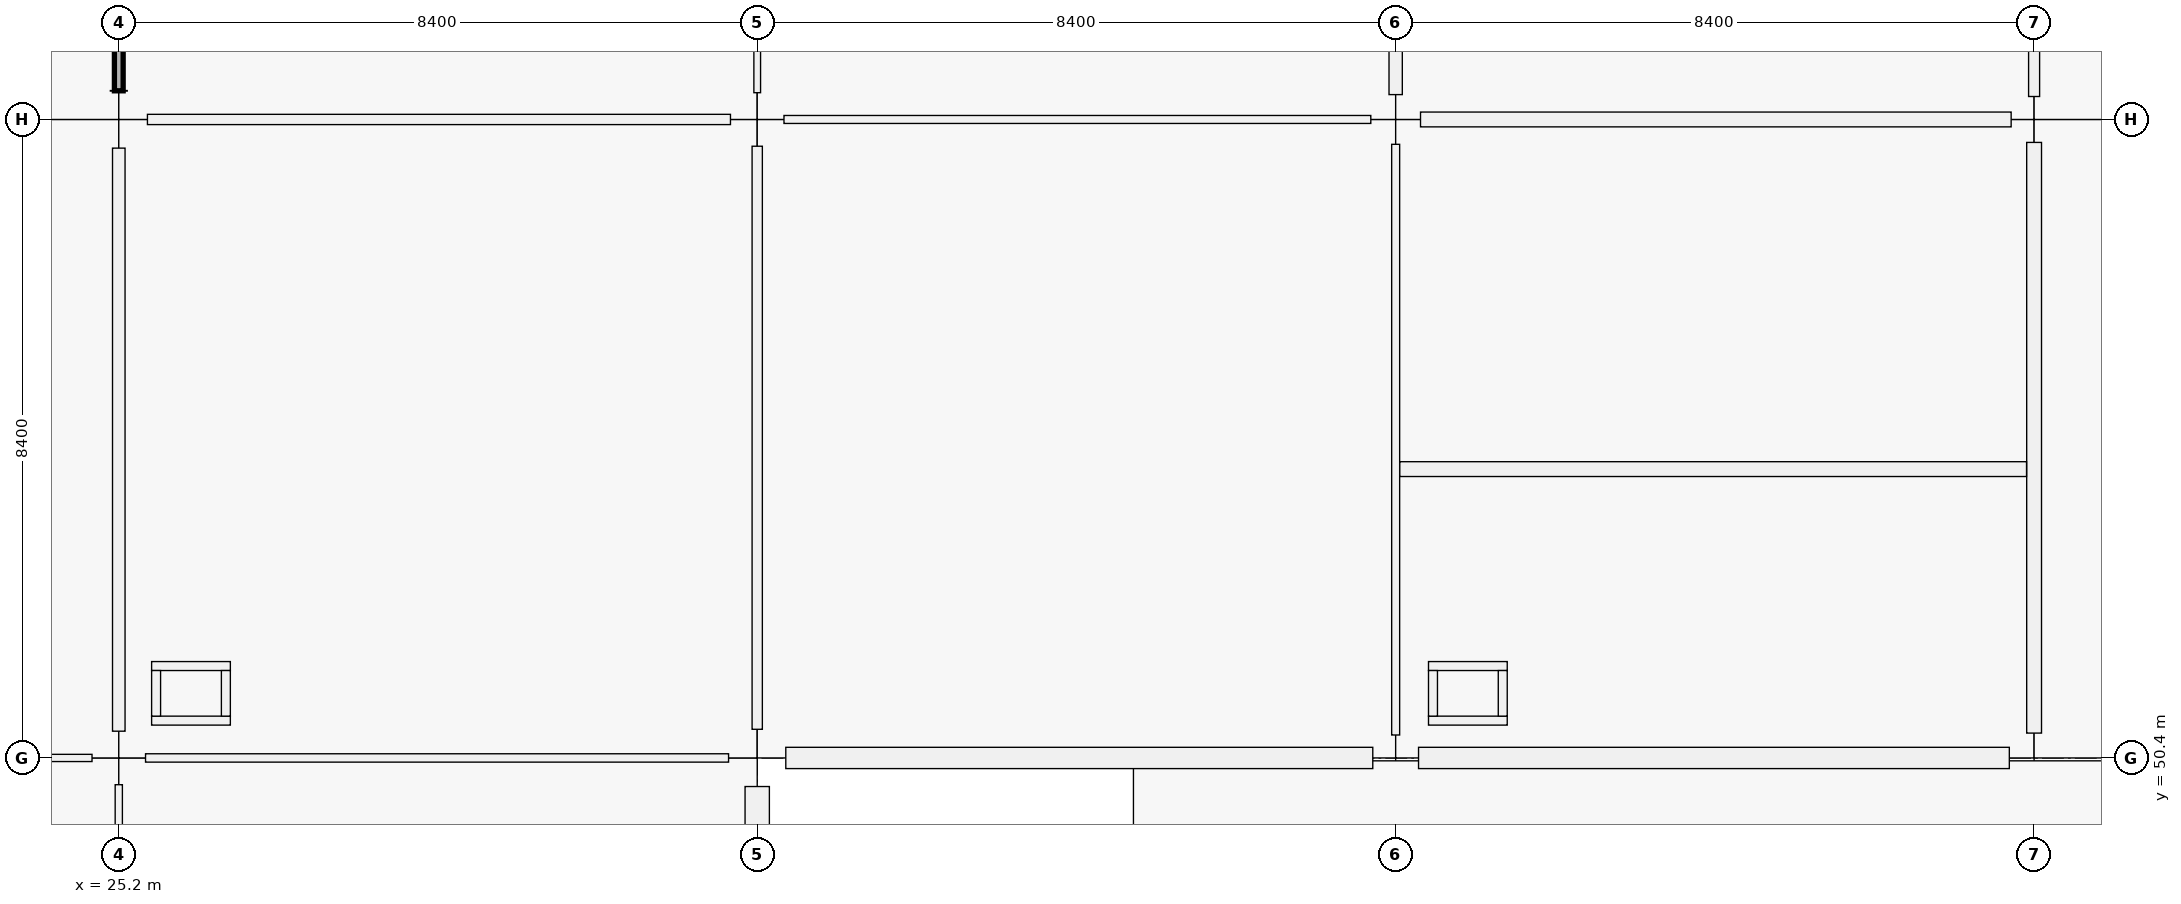
"""IFC4 building model, lengths in metres.
Left out: names, types, materials, properties, quantities, classifications, styles, units other than length and angle.
Written with IfcOpenShell. Run it as: python <this file> out.ifc"""

import sys

from ifc_helpers import new_model, si_unit, direction, frame, frame_2d, origin, origin_2d, place, context, subcontext, project, spatial, rectangle, extrude, element, fill, save


model = new_model("IFC4")
c1 = context("Model", 3, precision=1e-05, world=origin(), true_north=direction((0.0, 1.0)))
c2 = subcontext(c1, "Body", "Model", "MODEL_VIEW")
j1 = project(units=[si_unit("LENGTHUNIT", "METRE"), si_unit("PLANEANGLEUNIT", "RADIAN")], contexts=[c1])
p1 = place(None, origin())
s1 = spatial("IfcSite", under=j1, at=p1, CompositionType="ELEMENT")
p2 = place(p1, origin())
s2 = spatial("IfcBuilding", under=s1, at=p2, CompositionType="ELEMENT")
p3 = place(p2, frame((0.0, 0.0, 10.26)))
s3 = spatial("IfcBuildingStorey", under=s2, at=p3, CompositionType="ELEMENT", Elevation=10.26)
p4 = place(p3, frame((25.2, 50.4, 0.0), z_axis=(0.0, 0.0, 1.0), x_axis=(1.0, 0.0, 0.0)))
e1 = element("IfcColumn", 1, at=p4, inside=s3, PredefinedType="COLUMN", context=c2, shape_type="SweptSolid", body=[
    extrude(rectangle(XDim=0.7, YDim=0.7, at=origin_2d()), origin(), (0.0, 0.0, 1.0), 4.5),
])
for number, where, z_axis, x_axis in (
    (2, (25.2, 58.8, 0.0), (0.0, 0.0, 1.0), (1.0, 0.0, 0.0)),
    (3, (33.6, 50.4, 0.0), (0.0, 0.0, 1.0), (1.0, 0.0, 0.0)),
):
    element("IfcColumn", number, at=place(p3, frame(where, z_axis=z_axis, x_axis=x_axis)), inside=s3, PredefinedType="COLUMN", context=c2, shape_type="SweptSolid", body=[
        extrude(rectangle(XDim=0.75, YDim=0.75, at=origin_2d()), origin(), (0.0, 0.0, 1.0), 4.5),
    ])
p5 = place(p3, frame((33.6, 58.8, 0.0), z_axis=(0.0, 0.0, 1.0), x_axis=(1.0, 0.0, 0.0)))
e4 = element("IfcColumn", 4, at=p5, inside=s3, PredefinedType="COLUMN", context=c2, shape_type="SweptSolid", body=[
    extrude(rectangle(XDim=0.7, YDim=0.7, at=origin_2d()), origin(), (0.0, 0.0, 1.0), 4.5),
])
p6 = place(p3, frame((42.0, 50.4, 0.0), z_axis=(0.0, 0.0, 1.0), x_axis=(1.0, 0.0, 0.0)))
e5 = element("IfcColumn", 5, at=p6, inside=s3, PredefinedType="COLUMN", context=c2, shape_type="SweptSolid", body=[
    extrude(rectangle(XDim=0.6, YDim=0.6, at=origin_2d()), origin(), (0.0, 0.0, 1.0), 4.5),
])
for number, where, z_axis, x_axis in (
    (6, (42.0, 58.8, 0.0), (0.0, 0.0, 1.0), (1.0, 0.0, 0.0)),
    (7, (50.4, 50.4, 0.0), (0.0, 0.0, 1.0), (1.0, 0.0, 0.0)),
):
    element("IfcColumn", number, at=place(p3, frame(where, z_axis=z_axis, x_axis=x_axis)), inside=s3, PredefinedType="COLUMN", context=c2, shape_type="SweptSolid", body=[
        extrude(rectangle(XDim=0.65, YDim=0.65, at=origin_2d()), origin(), (0.0, 0.0, 1.0), 4.5),
    ])
p7 = place(p3, frame((50.4, 58.8, 0.0), z_axis=(0.0, 0.0, 1.0), x_axis=(1.0, 0.0, 0.0)))
e8 = element("IfcColumn", 8, at=p7, inside=s3, PredefinedType="COLUMN", context=c2, shape_type="SweptSolid", body=[
    extrude(rectangle(XDim=0.6, YDim=0.6, at=origin_2d()), origin(), (0.0, 0.0, 1.0), 4.5),
])
p8 = place(p3, frame((33.6, 50.024, 0.0), z_axis=(0.0, 0.0, 1.0), x_axis=(0.0, -1.0, 0.0)))
e9 = element("IfcWall", 9, at=p8, inside=s3, PredefinedType="SOLIDWALL", context=c2, shape_type="SweptSolid", body=[
    extrude(rectangle(XDim=7.673, YDim=0.32, at=frame_2d((3.836, 0.0))), origin(), (0.0, 0.0, 1.0), 3.54),
])
p9 = place(p8, frame((3.236, 0.0, 0.9)))
e10 = element("IfcOpeningElement", 10, at=p9, cuts=e9, PredefinedType="OPENING", context=c2, shape_type="SweptSolid", body=[
    extrude(rectangle(XDim=1.2, YDim=2.1, at=frame_2d((0.6, 1.05))), frame((0.0, 0.16, 0.0), z_axis=(0.0, -1.0, 0.0), x_axis=(1.0, 0.0, 0.0)), (0.0, 0.0, 1.0), 0.32),
])
p10 = place(p3, frame((41.699, 50.4, 0.0), z_axis=(0.0, 0.0, 1.0), x_axis=(-1.0, 0.0, 0.0)))
e11 = element("IfcWall", 11, at=p10, inside=s3, PredefinedType="SOLIDWALL", context=c2, shape_type="SweptSolid", body=[
    extrude(rectangle(XDim=7.723, YDim=0.28, at=frame_2d((3.861, 0.0))), origin(), (0.0, 0.0, 1.0), 3.54),
])
p11 = place(p10, frame((2.761, 0.0, 0.9)))
e12 = element("IfcOpeningElement", 12, at=p11, cuts=e11, PredefinedType="OPENING", context=c2, shape_type="SweptSolid", body=[
    extrude(rectangle(XDim=2.2, YDim=1.35, at=frame_2d((1.1, 0.675))), frame((0.0, 0.14, 0.0), z_axis=(0.0, -1.0, 0.0), x_axis=(1.0, 0.0, 0.0)), (0.0, 0.0, 1.0), 0.28),
])
p12 = place(p3, frame((50.074, 50.4, 0.0), z_axis=(0.0, 0.0, 1.0), x_axis=(-1.0, 0.0, 0.0)))
e13 = element("IfcWall", 13, at=p12, inside=s3, PredefinedType="SOLIDWALL", context=c2, shape_type="SweptSolid", body=[
    extrude(rectangle(XDim=7.773, YDim=0.28, at=frame_2d((3.886, 0.0))), origin(), (0.0, 0.0, 1.0), 3.54),
])
p13 = place(p12, frame((2.936, 0.0, 0.9)))
e14 = element("IfcOpeningElement", 14, at=p13, cuts=e13, PredefinedType="OPENING", context=c2, shape_type="SweptSolid", body=[
    extrude(rectangle(XDim=1.9, YDim=1.75, at=frame_2d((0.95, 0.875))), frame((0.0, 0.14, 0.0), z_axis=(0.0, -1.0, 0.0), x_axis=(1.0, 0.0, 0.0)), (0.0, 0.0, 1.0), 0.28),
])
for number, where, z_axis, x_axis in (
    (15, (25.632, 50.891, 0.0), (0.0, 0.0, 1.0), (1.0, 0.0, 0.0)),
    (16, (25.632, 51.609, 0.0), (0.0, 0.0, 1.0), (1.0, 0.0, 0.0)),
):
    element("IfcWall", number, at=place(p3, frame(where, z_axis=z_axis, x_axis=x_axis)), inside=s3, PredefinedType="PARTITIONING", context=c2, shape_type="SweptSolid", body=[
        extrude(rectangle(XDim=1.036, YDim=0.118, at=frame_2d((0.518, 0.0))), origin(), (0.0, 0.0, 1.0), 3.53),
    ])
for number, where, z_axis, x_axis in (
    (17, (25.691, 50.95, 0.0), (0.0, 0.0, 1.0), (0.0, 1.0, 0.0)),
    (18, (26.609, 50.95, 0.0), (0.0, 0.0, 1.0), (0.0, 1.0, 0.0)),
):
    element("IfcWall", number, at=place(p3, frame(where, z_axis=z_axis, x_axis=x_axis)), inside=s3, PredefinedType="PARTITIONING", context=c2, shape_type="SweptSolid", body=[
        extrude(rectangle(XDim=0.6, YDim=0.118, at=frame_2d((0.3, 0.0))), origin(), (0.0, 0.0, 1.0), 3.53),
    ])
for number, where, z_axis, x_axis in (
    (19, (42.432, 50.891, 0.0), (0.0, 0.0, 1.0), (1.0, 0.0, 0.0)),
    (20, (42.432, 51.609, 0.0), (0.0, 0.0, 1.0), (1.0, 0.0, 0.0)),
):
    element("IfcWall", number, at=place(p3, frame(where, z_axis=z_axis, x_axis=x_axis)), inside=s3, PredefinedType="PARTITIONING", context=c2, shape_type="SweptSolid", body=[
        extrude(rectangle(XDim=1.036, YDim=0.118, at=frame_2d((0.518, 0.0))), origin(), (0.0, 0.0, 1.0), 3.53),
    ])
for number, where, z_axis, x_axis in (
    (21, (42.491, 50.95, 0.0), (0.0, 0.0, 1.0), (0.0, 1.0, 0.0)),
    (22, (43.409, 50.95, 0.0), (0.0, 0.0, 1.0), (0.0, 1.0, 0.0)),
):
    element("IfcWall", number, at=place(p3, frame(where, z_axis=z_axis, x_axis=x_axis)), inside=s3, PredefinedType="PARTITIONING", context=c2, shape_type="SweptSolid", body=[
        extrude(rectangle(XDim=0.6, YDim=0.118, at=frame_2d((0.3, 0.0))), origin(), (0.0, 0.0, 1.0), 3.53),
    ])
p14 = place(p3, frame((17.177, 50.4, 0.0), z_axis=(0.0, 0.0, 1.0), x_axis=(1.0, 0.0, 0.0)))
e23 = element("IfcWall", 23, at=p14, inside=s3, PredefinedType="PARTITIONING", context=c2, shape_type="SweptSolid", body=[
    extrude(rectangle(XDim=7.671, YDim=0.095, at=frame_2d((3.835, 0.0))), origin(), (0.0, 0.0, 1.0), 3.37),
])
p15 = place(p14, frame((0.608, 0.0, 0.0)))
e24 = element("IfcOpeningElement", 24, at=p15, cuts=e23, PredefinedType="OPENING", context=c2, shape_type="SweptSolid", body=[
    extrude(rectangle(XDim=0.96, YDim=2.1, at=frame_2d((0.48, 1.05))), frame((0.0, 0.047, 0.0), z_axis=(0.0, -1.0, 0.0), x_axis=(1.0, 0.0, 0.0)), (0.0, 0.0, 1.0), 0.095),
])
p16 = place(p14, frame((4.548, 0.0, 0.0)))
e25 = element("IfcOpeningElement", 25, at=p16, cuts=e23, PredefinedType="OPENING", context=c2, shape_type="SweptSolid", body=[
    extrude(rectangle(XDim=0.92, YDim=2.1, at=frame_2d((0.46, 1.05))), frame((0.0, 0.047, 0.0), z_axis=(0.0, -1.0, 0.0), x_axis=(1.0, 0.0, 0.0)), (0.0, 0.0, 1.0), 0.095),
])
p17 = place(p3, frame((25.552, 50.4, 0.0), z_axis=(0.0, 0.0, 1.0), x_axis=(1.0, 0.0, 0.0)))
e26 = element("IfcWall", 26, at=p17, inside=s3, PredefinedType="MOVABLE", context=c2, shape_type="SweptSolid", body=[
    extrude(rectangle(XDim=7.671, YDim=0.11, at=frame_2d((3.835, 0.0))), origin(), (0.0, 0.0, 1.0), 3.37),
])
p18 = place(p17, frame((3.296, 0.0, 0.0)))
e27 = element("IfcOpeningElement", 27, at=p18, cuts=e26, PredefinedType="OPENING", context=c2, shape_type="SweptSolid", body=[
    extrude(rectangle(XDim=1.08, YDim=2.25, at=frame_2d((0.54, 1.125))), frame((0.0, 0.055, 0.0), z_axis=(0.0, -1.0, 0.0), x_axis=(1.0, 0.0, 0.0)), (0.0, 0.0, 1.0), 0.11),
])
p19 = place(p3, frame((25.577, 58.8, 0.0), z_axis=(0.0, 0.0, 1.0), x_axis=(1.0, 0.0, 0.0)))
e28 = element("IfcWall", 28, at=p19, inside=s3, PredefinedType="PARTITIONING", context=c2, shape_type="SweptSolid", body=[
    extrude(rectangle(XDim=7.671, YDim=0.135, at=frame_2d((3.835, 0.0))), origin(), (0.0, 0.0, 1.0), 3.37),
])
p20 = place(p19, frame((3.306, 0.0, 0.0)))
e29 = element("IfcOpeningElement", 29, at=p20, cuts=e28, PredefinedType="OPENING", context=c2, shape_type="SweptSolid", body=[
    extrude(rectangle(XDim=1.06, YDim=2.25, at=frame_2d((0.53, 1.125))), frame((0.0, 0.067, 0.0), z_axis=(0.0, -1.0, 0.0), x_axis=(1.0, 0.0, 0.0)), (0.0, 0.0, 1.0), 0.135),
])
p21 = place(p3, frame((33.952, 58.8, 0.0), z_axis=(0.0, 0.0, 1.0), x_axis=(1.0, 0.0, 0.0)))
e30 = element("IfcWall", 30, at=p21, inside=s3, PredefinedType="PARTITIONING", context=c2, shape_type="SweptSolid", body=[
    extrude(rectangle(XDim=7.721, YDim=0.105, at=frame_2d((3.861, 0.0))), origin(), (0.0, 0.0, 1.0), 3.37),
])
p22 = place(p21, frame((3.351, 0.0, 0.0)))
e31 = element("IfcOpeningElement", 31, at=p22, cuts=e30, PredefinedType="OPENING", context=c2, shape_type="SweptSolid", body=[
    extrude(rectangle(XDim=1.02, YDim=2.2, at=frame_2d((0.51, 1.1))), frame((0.0, 0.052, 0.0), z_axis=(0.0, -1.0, 0.0), x_axis=(1.0, 0.0, 0.0)), (0.0, 0.0, 1.0), 0.105),
])
p23 = place(p3, frame((42.327, 58.8, 0.0), z_axis=(0.0, 0.0, 1.0), x_axis=(1.0, 0.0, 0.0)))
e32 = element("IfcWall", 32, at=p23, inside=s3, PredefinedType="PARTITIONING", context=c2, shape_type="SweptSolid", body=[
    extrude(rectangle(XDim=7.771, YDim=0.195, at=frame_2d((3.885, 0.0))), origin(), (0.0, 0.0, 1.0), 3.37),
])
p24 = place(p3, frame((25.2, 42.377, 0.0), z_axis=(0.0, 0.0, 1.0), x_axis=(0.0, 1.0, 0.0)))
e33 = element("IfcWall", 33, at=p24, inside=s3, PredefinedType="PARTITIONING", context=c2, shape_type="SweptSolid", body=[
    extrude(rectangle(XDim=7.671, YDim=0.095, at=frame_2d((3.835, 0.0))), origin(), (0.0, 0.0, 1.0), 3.37),
])
p25 = place(p3, frame((25.2, 50.752, 0.0), z_axis=(0.0, 0.0, 1.0), x_axis=(0.0, 1.0, 0.0)))
e34 = element("IfcWall", 34, at=p25, inside=s3, PredefinedType="PARTITIONING", context=c2, shape_type="SweptSolid", body=[
    extrude(rectangle(XDim=7.671, YDim=0.165, at=frame_2d((3.835, 0.0))), origin(), (0.0, 0.0, 1.0), 3.37),
])
p26 = place(p25, frame((3.306, 0.0, 0.0)))
e35 = element("IfcOpeningElement", 35, at=p26, cuts=e34, PredefinedType="OPENING", context=c2, shape_type="SweptSolid", body=[
    extrude(rectangle(XDim=1.06, YDim=2.25, at=frame_2d((0.53, 1.125))), frame((0.0, 0.083, 0.0), z_axis=(0.0, -1.0, 0.0), x_axis=(1.0, 0.0, 0.0)), (0.0, 0.0, 1.0), 0.165),
])
p27 = place(p3, frame((25.2, 59.177, 0.0), z_axis=(0.0, 0.0, 1.0), x_axis=(0.0, 1.0, 0.0)))
e36 = element("IfcWall", 36, at=p27, inside=s3, PredefinedType="PARTITIONING", context=c2, shape_type="SweptSolid", body=[
    extrude(rectangle(XDim=7.671, YDim=0.115, at=frame_2d((3.835, 0.0))), origin(), (0.0, 0.0, 1.0), 3.37),
])
p28 = place(p27, frame((3.316, 0.0, 0.0)))
e37 = element("IfcOpeningElement", 37, at=p28, cuts=e36, PredefinedType="OPENING", context=c2, shape_type="SweptSolid", body=[
    extrude(rectangle(XDim=1.04, YDim=2.2, at=frame_2d((0.52, 1.1))), frame((0.0, 0.058, 0.0), z_axis=(0.0, -1.0, 0.0), x_axis=(1.0, 0.0, 0.0)), (0.0, 0.0, 1.0), 0.115),
])
p29 = place(p3, frame((33.6, 50.777, 0.0), z_axis=(0.0, 0.0, 1.0), x_axis=(0.0, 1.0, 0.0)))
e38 = element("IfcWall", 38, at=p29, inside=s3, PredefinedType="PARTITIONING", context=c2, shape_type="SweptSolid", body=[
    extrude(rectangle(XDim=7.671, YDim=0.135, at=frame_2d((3.835, 0.0))), origin(), (0.0, 0.0, 1.0), 3.37),
])
p30 = place(p29, frame((3.336, 0.0, 0.0)))
e39 = element("IfcOpeningElement", 39, at=p30, cuts=e38, PredefinedType="OPENING", context=c2, shape_type="SweptSolid", body=[
    extrude(rectangle(XDim=1.0, YDim=2.2, at=frame_2d((0.5, 1.1))), frame((0.0, 0.067, 0.0), z_axis=(0.0, -1.0, 0.0), x_axis=(1.0, 0.0, 0.0)), (0.0, 0.0, 1.0), 0.135),
])
p31 = place(p3, frame((33.6, 59.152, 0.0), z_axis=(0.0, 0.0, 1.0), x_axis=(0.0, 1.0, 0.0)))
e40 = element("IfcWall", 40, at=p31, inside=s3, PredefinedType="PARTITIONING", context=c2, shape_type="SweptSolid", body=[
    extrude(rectangle(XDim=7.671, YDim=0.088, at=frame_2d((3.835, 0.0))), origin(), (0.0, 0.0, 1.0), 3.37),
])
p32 = place(p31, frame((3.365, 0.0, 0.0)))
e41 = element("IfcOpeningElement", 41, at=p32, cuts=e40, PredefinedType="OPENING", context=c2, shape_type="SweptSolid", body=[
    extrude(rectangle(XDim=0.94, YDim=2.15, at=frame_2d((0.47, 1.075))), frame((0.0, 0.044, 0.0), z_axis=(0.0, -1.0, 0.0), x_axis=(1.0, 0.0, 0.0)), (0.0, 0.0, 1.0), 0.088),
])
p33 = place(p3, frame((42.0, 50.702, 0.0), z_axis=(0.0, 0.0, 1.0), x_axis=(0.0, 1.0, 0.0)))
e42 = element("IfcWall", 42, at=p33, inside=s3, PredefinedType="PARTITIONING", context=c2, shape_type="SweptSolid", body=[
    extrude(rectangle(XDim=7.771, YDim=0.105, at=frame_2d((3.885, 0.0))), origin(), (0.0, 0.0, 1.0), 3.37),
])
p34 = place(p3, frame((42.0, 59.127, 0.0), z_axis=(0.0, 0.0, 1.0), x_axis=(0.0, 1.0, 0.0)))
e43 = element("IfcWall", 43, at=p34, inside=s3, PredefinedType="PARTITIONING", context=c2, shape_type="SweptSolid", body=[
    extrude(rectangle(XDim=7.721, YDim=0.175, at=frame_2d((3.86, 0.0))), origin(), (0.0, 0.0, 1.0), 3.37),
])
p35 = place(p3, frame((50.4, 50.727, 0.0), z_axis=(0.0, 0.0, 1.0), x_axis=(0.0, 1.0, 0.0)))
e44 = element("IfcWall", 44, at=p35, inside=s3, PredefinedType="PARTITIONING", context=c2, shape_type="SweptSolid", body=[
    extrude(rectangle(XDim=7.771, YDim=0.195, at=frame_2d((3.885, 0.0))), origin(), (0.0, 0.0, 1.0), 3.37),
])
p36 = place(p35, frame((1.173, 0.0, 0.0)))
e45 = element("IfcOpeningElement", 45, at=p36, cuts=e44, PredefinedType="OPENING", context=c2, shape_type="SweptSolid", body=[
    extrude(rectangle(XDim=1.08, YDim=2.25, at=frame_2d((0.54, 1.125))), frame((0.0, 0.098, 0.0), z_axis=(0.0, -1.0, 0.0), x_axis=(1.0, 0.0, 0.0)), (0.0, 0.0, 1.0), 0.195),
])
p37 = place(p35, frame((5.103, 0.0, 0.0)))
e46 = element("IfcOpeningElement", 46, at=p37, cuts=e44, PredefinedType="OPENING", context=c2, shape_type="SweptSolid", body=[
    extrude(rectangle(XDim=1.06, YDim=2.25, at=frame_2d((0.53, 1.125))), frame((0.0, 0.098, 0.0), z_axis=(0.0, -1.0, 0.0), x_axis=(1.0, 0.0, 0.0)), (0.0, 0.0, 1.0), 0.195),
])
p38 = place(p3, frame((50.4, 59.102, 0.0), z_axis=(0.0, 0.0, 1.0), x_axis=(0.0, 1.0, 0.0)))
e47 = element("IfcWall", 47, at=p38, inside=s3, PredefinedType="PARTITIONING", context=c2, shape_type="SweptSolid", body=[
    extrude(rectangle(XDim=7.721, YDim=0.145, at=frame_2d((3.86, 0.0))), origin(), (0.0, 0.0, 1.0), 3.37),
])
p39 = place(p38, frame((1.218, 0.0, 0.0)))
e48 = element("IfcOpeningElement", 48, at=p39, cuts=e47, PredefinedType="OPENING", context=c2, shape_type="SweptSolid", body=[
    extrude(rectangle(XDim=1.04, YDim=2.2, at=frame_2d((0.52, 1.1))), frame((0.0, 0.073, 0.0), z_axis=(0.0, -1.0, 0.0), x_axis=(1.0, 0.0, 0.0)), (0.0, 0.0, 1.0), 0.145),
])
p40 = place(p38, frame((5.148, 0.0, 0.0)))
e49 = element("IfcOpeningElement", 49, at=p40, cuts=e47, PredefinedType="OPENING", context=c2, shape_type="SweptSolid", body=[
    extrude(rectangle(XDim=1.02, YDim=2.2, at=frame_2d((0.51, 1.1))), frame((0.0, 0.073, 0.0), z_axis=(0.0, -1.0, 0.0), x_axis=(1.0, 0.0, 0.0)), (0.0, 0.0, 1.0), 0.145),
])
p41 = place(p3, frame((42.054, 54.2, 0.0), z_axis=(0.0, 0.0, 1.0), x_axis=(1.0, 0.0, 0.0)))
e50 = element("IfcWall", 50, at=p41, inside=s3, PredefinedType="PARTITIONING", context=c2, shape_type="SweptSolid", body=[
    extrude(rectangle(XDim=8.246, YDim=0.195, at=frame_2d((4.123, 0.0))), origin(), (0.0, 0.0, 1.0), 3.37),
])
p42 = place(p11, origin())
e51 = element("IfcWindow", 51, at=p42, inside=s3, PartitioningType="SINGLE_PANEL", PredefinedType="WINDOW", context=c2, shape_type="SweptSolid", body=[
    extrude(rectangle(XDim=2.2, YDim=1.35, at=frame_2d((1.1, 0.675))), frame((0.0, 0.03, 0.0), z_axis=(0.0, -1.0, 0.0), x_axis=(1.0, 0.0, 0.0)), (0.0, 0.0, 1.0), 0.06),
])
fill(e12, e51)
p43 = place(p13, origin())
e52 = element("IfcWindow", 52, at=p43, inside=s3, PartitioningType="SINGLE_PANEL", PredefinedType="WINDOW", context=c2, shape_type="SweptSolid", body=[
    extrude(rectangle(XDim=1.9, YDim=1.75, at=frame_2d((0.95, 0.875))), frame((0.0, 0.03, 0.0), z_axis=(0.0, -1.0, 0.0), x_axis=(1.0, 0.0, 0.0)), (0.0, 0.0, 1.0), 0.06),
])
fill(e14, e52)
p44 = place(p36, origin())
e53 = element("IfcDoor", 53, at=p44, inside=s3, OperationType="SINGLE_SWING_RIGHT", PredefinedType="DOOR", context=c2, shape_type="SweptSolid", body=[
    extrude(rectangle(XDim=1.08, YDim=2.25, at=frame_2d((0.54, 1.125))), frame((0.0, 0.025, 0.0), z_axis=(0.0, -1.0, 0.0), x_axis=(1.0, 0.0, 0.0)), (0.0, 0.0, 1.0), 0.05),
])
fill(e45, e53)
p45 = place(p37, origin())
e54 = element("IfcDoor", 54, at=p45, inside=s3, OperationType="SINGLE_SWING_LEFT", PredefinedType="DOOR", context=c2, shape_type="SweptSolid", body=[
    extrude(rectangle(XDim=1.06, YDim=2.25, at=frame_2d((0.53, 1.125))), frame((0.0, 0.025, 0.0), z_axis=(0.0, -1.0, 0.0), x_axis=(1.0, 0.0, 0.0)), (0.0, 0.0, 1.0), 0.05),
])
fill(e46, e54)
p46 = place(p26, origin())
e55 = element("IfcDoor", 55, at=p46, inside=s3, OperationType="SINGLE_SWING_LEFT", PredefinedType="DOOR", context=c2, shape_type="SweptSolid", body=[
    extrude(rectangle(XDim=1.06, YDim=2.25, at=frame_2d((0.53, 1.125))), frame((0.0, 0.025, 0.0), z_axis=(0.0, -1.0, 0.0), x_axis=(1.0, 0.0, 0.0)), (0.0, 0.0, 1.0), 0.05),
])
fill(e35, e55)
p47 = place(p22, origin())
e56 = element("IfcDoor", 56, at=p47, inside=s3, OperationType="SINGLE_SWING_LEFT", PredefinedType="DOOR", context=c2, shape_type="SweptSolid", body=[
    extrude(rectangle(XDim=1.02, YDim=2.2, at=frame_2d((0.51, 1.1))), frame((0.0, 0.025, 0.0), z_axis=(0.0, -1.0, 0.0), x_axis=(1.0, 0.0, 0.0)), (0.0, 0.0, 1.0), 0.05),
])
fill(e31, e56)
p48 = place(p30, origin())
e57 = element("IfcDoor", 57, at=p48, inside=s3, OperationType="SINGLE_SWING_LEFT", PredefinedType="DOOR", context=c2, shape_type="SweptSolid", body=[
    extrude(rectangle(XDim=1.0, YDim=2.2, at=frame_2d((0.5, 1.1))), frame((0.0, 0.025, 0.0), z_axis=(0.0, -1.0, 0.0), x_axis=(1.0, 0.0, 0.0)), (0.0, 0.0, 1.0), 0.05),
])
fill(e39, e57)
p49 = place(p18, origin())
e58 = element("IfcDoor", 58, at=p49, inside=s3, OperationType="SINGLE_SWING_RIGHT", PredefinedType="DOOR", context=c2, shape_type="SweptSolid", body=[
    extrude(rectangle(XDim=1.08, YDim=2.25, at=frame_2d((0.54, 1.125))), frame((0.0, 0.025, 0.0), z_axis=(0.0, -1.0, 0.0), x_axis=(1.0, 0.0, 0.0)), (0.0, 0.0, 1.0), 0.05),
])
fill(e27, e58)
p50 = place(p20, origin())
e59 = element("IfcDoor", 59, at=p50, inside=s3, OperationType="SINGLE_SWING_LEFT", PredefinedType="DOOR", context=c2, shape_type="SweptSolid", body=[
    extrude(rectangle(XDim=1.06, YDim=2.25, at=frame_2d((0.53, 1.125))), frame((0.0, 0.025, 0.0), z_axis=(0.0, -1.0, 0.0), x_axis=(1.0, 0.0, 0.0)), (0.0, 0.0, 1.0), 0.05),
])
fill(e29, e59)
save(model, sys.argv[1])
